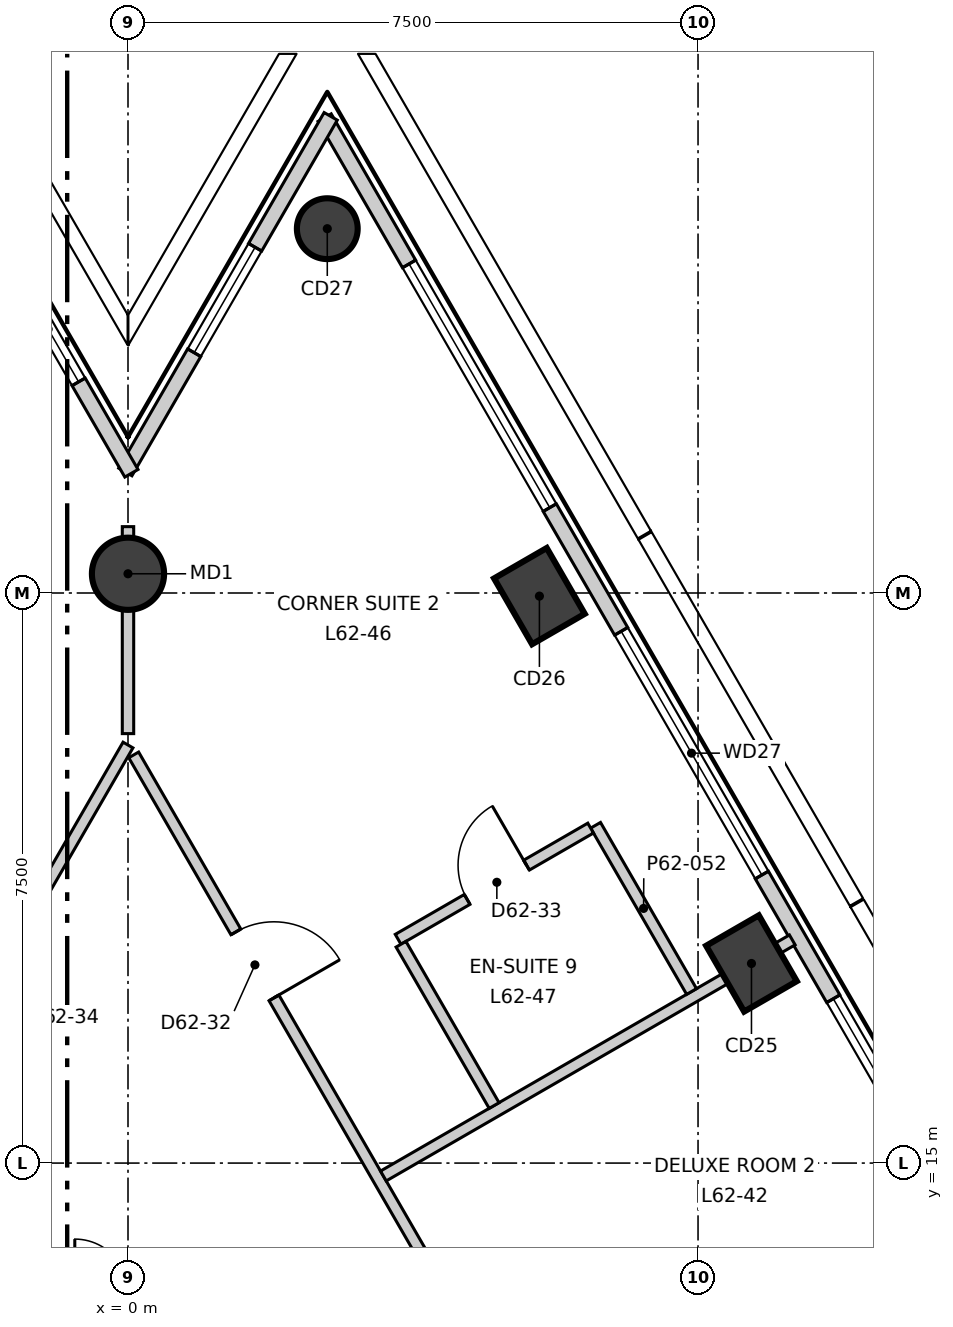
"""IFC4 building model, lengths in metres.
Left out: names, types, materials, properties, quantities, classifications, styles, units other than length and angle.
Written with IfcOpenShell. Run it as: python <this file> out.ifc"""

import sys

from ifc_helpers import new_model, si_unit, direction, frame, frame_2d, origin, origin_2d, place, context, subcontext, project, spatial, rectangle, circle, extrude, element, fill, save


model = new_model("IFC4")
c1 = context("Model", 3, precision=1e-05, world=origin(), true_north=direction((0.0, 1.0)))
c2 = subcontext(c1, "Body", "Model", "MODEL_VIEW")
j1 = project(units=[si_unit("LENGTHUNIT", "METRE"), si_unit("PLANEANGLEUNIT", "RADIAN")], contexts=[c1])
p1 = place(None, origin())
s1 = spatial("IfcSite", under=j1, at=p1, CompositionType="ELEMENT")
p2 = place(p1, origin())
s2 = spatial("IfcBuilding", under=s1, at=p2, CompositionType="ELEMENT")
p3 = place(p2, frame((0.0, 0.0, 268.3)))
s3 = spatial("IfcBuildingStorey", under=s2, at=p3, CompositionType="ELEMENT", Elevation=268.3)
for number, where, z_axis, x_axis in (
    (1, (8.203, 17.626, -0.3), (0.0, 0.0, 1.0), (-0.5, 0.866, 0.0)),
    (2, (5.413, 22.459, -0.3), (0.0, 0.0, 1.0), (-0.5, 0.866, 0.0)),
):
    element("IfcColumn", number, at=place(p3, frame(where, z_axis=z_axis, x_axis=x_axis)), inside=s3, PredefinedType="COLUMN", context=c2, shape_type="SweptSolid", body=[
        extrude(rectangle(XDim=1.0, YDim=0.8, at=origin_2d()), origin(), (0.0, 0.0, 1.0), 3.6),
    ])
p4 = place(p3, frame((2.622, 27.293, -0.3), z_axis=(0.0, 0.0, 1.0), x_axis=(-0.5, 0.866025403784, 0.0)))
e3 = element("IfcColumn", 3, at=p4, inside=s3, PredefinedType="COLUMN", context=c2, shape_type="SweptSolid", body=[
    extrude(circle(Radius=0.4, at=origin_2d()), origin(), (0.0, 0.0, 1.0), 3.6),
])
p5 = place(p3, frame((0.0, 22.753, -0.3), z_axis=(0.0, 0.0, 1.0), x_axis=(1.0, 0.0, 0.0)))
e4 = element("IfcColumn", 4, at=p5, inside=s3, PredefinedType="COLUMN", context=c2, shape_type="SweptSolid", body=[
    extrude(circle(Radius=0.475, at=origin_2d()), origin(), (0.0, 0.0, 1.0), 3.6),
])
p6 = place(p3, frame((26.205, -12.154, 0.0), z_axis=(0.0, 0.0, 1.0), x_axis=(-0.49999909388, 0.866025926932, 0.0)))
e5 = element("IfcWall", 5, at=p6, inside=s3, PredefinedType="ELEMENTEDWALL", context=c2, shape_type="SweptSolid", body=[
    extrude(rectangle(XDim=47.236, YDim=0.2, at=frame_2d((23.618, 0.0))), origin(), (0.0, 0.0, 1.0), 3.3),
])
p7 = place(p6, frame((2.243, 0.0, 0.9)))
e6 = element("IfcOpeningElement", 6, at=p7, cuts=e5, PredefinedType="OPENING", context=c2, shape_type="SweptSolid", body=[
    extrude(rectangle(XDim=3.7, YDim=2.2, at=frame_2d((1.85, 1.1))), frame((0.0, 0.11, 0.0), z_axis=(0.0, -1.0, 0.0), x_axis=(1.0, 0.0, 0.0)), (0.0, 0.0, 1.0), 0.22),
])
p8 = place(p6, frame((7.825, 0.0, 0.9)))
e7 = element("IfcOpeningElement", 7, at=p8, cuts=e5, PredefinedType="OPENING", context=c2, shape_type="SweptSolid", body=[
    extrude(rectangle(XDim=3.7, YDim=2.2, at=frame_2d((1.85, 1.1))), frame((0.0, 0.11, 0.0), z_axis=(0.0, -1.0, 0.0), x_axis=(1.0, 0.0, 0.0)), (0.0, 0.0, 1.0), 0.22),
])
p9 = place(p6, frame((13.406, 0.0, 0.9)))
e8 = element("IfcOpeningElement", 8, at=p9, cuts=e5, PredefinedType="OPENING", context=c2, shape_type="SweptSolid", body=[
    extrude(rectangle(XDim=3.7, YDim=2.2, at=frame_2d((1.85, 1.1))), frame((0.0, 0.11, 0.0), z_axis=(0.0, -1.0, 0.0), x_axis=(1.0, 0.0, 0.0)), (0.0, 0.0, 1.0), 0.22),
])
p10 = place(p6, frame((18.987, 0.0, 0.9)))
e9 = element("IfcOpeningElement", 9, at=p10, cuts=e5, PredefinedType="OPENING", context=c2, shape_type="SweptSolid", body=[
    extrude(rectangle(XDim=3.7, YDim=2.2, at=frame_2d((1.85, 1.1))), frame((0.0, 0.11, 0.0), z_axis=(0.0, -1.0, 0.0), x_axis=(1.0, 0.0, 0.0)), (0.0, 0.0, 1.0), 0.22),
])
p11 = place(p6, frame((24.569, 0.0, 0.9)))
e10 = element("IfcOpeningElement", 10, at=p11, cuts=e5, PredefinedType="OPENING", context=c2, shape_type="SweptSolid", body=[
    extrude(rectangle(XDim=3.7, YDim=2.2, at=frame_2d((1.85, 1.1))), frame((0.0, 0.11, 0.0), z_axis=(0.0, -1.0, 0.0), x_axis=(1.0, 0.0, 0.0)), (0.0, 0.0, 1.0), 0.22),
])
p12 = place(p6, frame((30.15, 0.0, 0.9)))
e11 = element("IfcOpeningElement", 11, at=p12, cuts=e5, PredefinedType="OPENING", context=c2, shape_type="SweptSolid", body=[
    extrude(rectangle(XDim=3.7, YDim=2.2, at=frame_2d((1.85, 1.1))), frame((0.0, 0.11, 0.0), z_axis=(0.0, -1.0, 0.0), x_axis=(1.0, 0.0, 0.0)), (0.0, 0.0, 1.0), 0.22),
])
p13 = place(p6, frame((35.732, 0.0, 0.9)))
e12 = element("IfcOpeningElement", 12, at=p13, cuts=e5, PredefinedType="OPENING", context=c2, shape_type="SweptSolid", body=[
    extrude(rectangle(XDim=3.7, YDim=2.2, at=frame_2d((1.85, 1.1))), frame((0.0, 0.11, 0.0), z_axis=(0.0, -1.0, 0.0), x_axis=(1.0, 0.0, 0.0)), (0.0, 0.0, 1.0), 0.22),
])
p14 = place(p6, frame((41.313, 0.0, 0.9)))
e13 = element("IfcOpeningElement", 13, at=p14, cuts=e5, PredefinedType="OPENING", context=c2, shape_type="SweptSolid", body=[
    extrude(rectangle(XDim=3.7, YDim=2.2, at=frame_2d((1.85, 1.1))), frame((0.0, 0.11, 0.0), z_axis=(0.0, -1.0, 0.0), x_axis=(1.0, 0.0, 0.0)), (0.0, 0.0, 1.0), 0.22),
])
p15 = place(p3, frame((2.667, 28.771, 0.0), z_axis=(0.0, 0.0, 1.0), x_axis=(-0.500070558953, -0.865984662721, 0.0)))
e14 = element("IfcWall", 14, at=p15, inside=s3, PredefinedType="ELEMENTEDWALL", context=c2, shape_type="SweptSolid", body=[
    extrude(rectangle(XDim=5.403, YDim=0.2, at=frame_2d((2.702, 0.0))), origin(), (0.0, 0.0, 1.0), 3.3),
])
p16 = place(p15, frame((1.99, 0.0, 0.9)))
e15 = element("IfcOpeningElement", 15, at=p16, cuts=e14, PredefinedType="OPENING", context=c2, shape_type="SweptSolid", body=[
    extrude(rectangle(XDim=1.6, YDim=2.2, at=frame_2d((0.8, 1.1))), frame((0.0, 0.11, 0.0), z_axis=(0.0, -1.0, 0.0), x_axis=(1.0, 0.0, 0.0)), (0.0, 0.0, 1.0), 0.22),
])
p17 = place(p3, frame((0.045, 24.075, 0.0), z_axis=(0.0, 0.0, 1.0), x_axis=(-0.500070558953, 0.865984662721, 0.0)))
e16 = element("IfcWall", 16, at=p17, inside=s3, PredefinedType="ELEMENTEDWALL", context=c2, shape_type="SweptSolid", body=[
    extrude(rectangle(XDim=5.403, YDim=0.2, at=frame_2d((2.702, 0.0))), origin(), (0.0, 0.0, 1.0), 3.3),
])
p18 = place(p17, frame((1.39, 0.0, 0.9)))
e17 = element("IfcOpeningElement", 17, at=p18, cuts=e16, PredefinedType="OPENING", context=c2, shape_type="SweptSolid", body=[
    extrude(rectangle(XDim=1.6, YDim=2.2, at=frame_2d((0.8, 1.1))), frame((0.0, 0.11, 0.0), z_axis=(0.0, -1.0, 0.0), x_axis=(1.0, 0.0, 0.0)), (0.0, 0.0, 1.0), 0.22),
])
p19 = place(p3, frame((-17.678, -10.12, 0.0), z_axis=(0.0, 0.0, 1.0), x_axis=(0.49998824015, 0.86603219323, 0.0)))
e18 = element("IfcWall", 18, at=p19, inside=s3, PredefinedType="PARTITIONING", context=c2, shape_type="SweptSolid", body=[
    extrude(rectangle(XDim=35.357, YDim=0.15, at=frame_2d((17.678, 0.0))), origin(), (0.0, 0.0, 1.0), 3.3),
])
p20 = place(p19, frame((31.607, 0.0, 0.0)))
e19 = element("IfcOpeningElement", 19, at=p20, cuts=e18, PredefinedType="OPENING", context=c2, shape_type="SweptSolid", body=[
    extrude(rectangle(XDim=1.0, YDim=2.1, at=frame_2d((0.5, 1.05))), frame((0.0, 0.085, 0.0), z_axis=(0.0, -1.0, 0.0), x_axis=(1.0, 0.0, 0.0)), (0.0, 0.0, 1.0), 0.17),
])
p21 = place(p19, frame((19.416, 0.0, 0.0)))
e20 = element("IfcOpeningElement", 20, at=p21, cuts=e18, PredefinedType="OPENING", context=c2, shape_type="SweptSolid", body=[
    extrude(rectangle(XDim=1.0, YDim=2.1, at=frame_2d((0.5, 1.05))), frame((0.0, 0.085, 0.0), z_axis=(0.0, -1.0, 0.0), x_axis=(1.0, 0.0, 0.0)), (0.0, 0.0, 1.0), 0.17),
])
p22 = place(p19, frame((24.916, 0.0, 0.0)))
e21 = element("IfcOpeningElement", 21, at=p22, cuts=e18, PredefinedType="OPENING", context=c2, shape_type="SweptSolid", body=[
    extrude(rectangle(XDim=0.9, YDim=2.1, at=frame_2d((0.45, 1.05))), frame((0.0, 0.085, 0.0), z_axis=(0.0, -1.0, 0.0), x_axis=(1.0, 0.0, 0.0)), (0.0, 0.0, 1.0), 0.17),
])
p23 = place(p19, frame((22.816, 0.0, 0.0)))
e22 = element("IfcOpeningElement", 22, at=p23, cuts=e18, PredefinedType="OPENING", context=c2, shape_type="SweptSolid", body=[
    extrude(rectangle(XDim=0.9, YDim=2.1, at=frame_2d((0.45, 1.05))), frame((0.0, 0.085, 0.0), z_axis=(0.0, -1.0, 0.0), x_axis=(1.0, 0.0, 0.0)), (0.0, 0.0, 1.0), 0.17),
])
p24 = place(p19, frame((14.654, 0.0, 0.0)))
e23 = element("IfcOpeningElement", 23, at=p24, cuts=e18, PredefinedType="OPENING", context=c2, shape_type="SweptSolid", body=[
    extrude(rectangle(XDim=1.0, YDim=2.1, at=frame_2d((0.5, 1.05))), frame((0.0, 0.085, 0.0), z_axis=(0.0, -1.0, 0.0), x_axis=(1.0, 0.0, 0.0)), (0.0, 0.0, 1.0), 0.17),
])
p25 = place(p19, frame((7.672, 0.0, 0.0)))
e24 = element("IfcOpeningElement", 24, at=p25, cuts=e18, PredefinedType="OPENING", context=c2, shape_type="SweptSolid", body=[
    extrude(rectangle(XDim=1.0, YDim=2.1, at=frame_2d((0.5, 1.05))), frame((0.0, 0.085, 0.0), z_axis=(0.0, -1.0, 0.0), x_axis=(1.0, 0.0, 0.0)), (0.0, 0.0, 1.0), 0.17),
])
p26 = place(p19, frame((2.69, 0.0, 0.0)))
e25 = element("IfcOpeningElement", 25, at=p26, cuts=e18, PredefinedType="OPENING", context=c2, shape_type="SweptSolid", body=[
    extrude(rectangle(XDim=1.0, YDim=2.1, at=frame_2d((0.5, 1.05))), frame((0.0, 0.085, 0.0), z_axis=(0.0, -1.0, 0.0), x_axis=(1.0, 0.0, 0.0)), (0.0, 0.0, 1.0), 0.17),
])
p27 = place(p3, frame((0.0, 20.65, 0.0), z_axis=(0.0, 0.0, 1.0), x_axis=(0.0, 1.0, 0.0)))
e26 = element("IfcWall", 26, at=p27, inside=s3, PredefinedType="PARTITIONING", context=c2, shape_type="SweptSolid", body=[
    extrude(rectangle(XDim=2.723, YDim=0.15, at=frame_2d((1.362, 0.0))), origin(), (0.0, 0.0, 1.0), 2.8),
])
p28 = place(p3, frame((0.075, 20.37, 0.0), z_axis=(0.0, 0.0, 1.0), x_axis=(0.499988971979, -0.866031770721, 0.0)))
e27 = element("IfcWall", 27, at=p28, inside=s3, PredefinedType="PARTITIONING", context=c2, shape_type="SweptSolid", body=[
    extrude(rectangle(XDim=35.207, YDim=0.15, at=frame_2d((17.604, 0.0))), origin(), (0.0, 0.0, 1.0), 3.3),
])
p29 = place(p28, frame((31.606, 0.0, 0.0)))
e28 = element("IfcOpeningElement", 28, at=p29, cuts=e27, PredefinedType="OPENING", context=c2, shape_type="SweptSolid", body=[
    extrude(rectangle(XDim=1.0, YDim=2.1, at=frame_2d((0.5, 1.05))), frame((0.0, 0.085, 0.0), z_axis=(0.0, -1.0, 0.0), x_axis=(1.0, 0.0, 0.0)), (0.0, 0.0, 1.0), 0.17),
])
p30 = place(p28, frame((24.316, 0.0, 0.0)))
e29 = element("IfcOpeningElement", 29, at=p30, cuts=e27, PredefinedType="OPENING", context=c2, shape_type="SweptSolid", body=[
    extrude(rectangle(XDim=1.0, YDim=2.1, at=frame_2d((0.5, 1.05))), frame((0.0, 0.085, 0.0), z_axis=(0.0, -1.0, 0.0), x_axis=(1.0, 0.0, 0.0)), (0.0, 0.0, 1.0), 0.17),
])
p31 = place(p28, frame((18.735, 0.0, 0.0)))
e30 = element("IfcOpeningElement", 30, at=p31, cuts=e27, PredefinedType="OPENING", context=c2, shape_type="SweptSolid", body=[
    extrude(rectangle(XDim=1.0, YDim=2.1, at=frame_2d((0.5, 1.05))), frame((0.0, 0.085, 0.0), z_axis=(0.0, -1.0, 0.0), x_axis=(1.0, 0.0, 0.0)), (0.0, 0.0, 1.0), 0.17),
])
p32 = place(p28, frame((8.154, 0.0, 0.0)))
e31 = element("IfcOpeningElement", 31, at=p32, cuts=e27, PredefinedType="OPENING", context=c2, shape_type="SweptSolid", body=[
    extrude(rectangle(XDim=1.0, YDim=2.1, at=frame_2d((0.5, 1.05))), frame((0.0, 0.085, 0.0), z_axis=(0.0, -1.0, 0.0), x_axis=(1.0, 0.0, 0.0)), (0.0, 0.0, 1.0), 0.17),
])
p33 = place(p28, frame((13.754, 0.0, 0.0)))
e32 = element("IfcOpeningElement", 32, at=p33, cuts=e27, PredefinedType="OPENING", context=c2, shape_type="SweptSolid", body=[
    extrude(rectangle(XDim=0.9, YDim=2.1, at=frame_2d((0.45, 1.05))), frame((0.0, 0.085, 0.0), z_axis=(0.0, -1.0, 0.0), x_axis=(1.0, 0.0, 0.0)), (0.0, 0.0, 1.0), 0.17),
])
p34 = place(p28, frame((11.554, 0.0, 0.0)))
e33 = element("IfcOpeningElement", 33, at=p34, cuts=e27, PredefinedType="OPENING", context=c2, shape_type="SweptSolid", body=[
    extrude(rectangle(XDim=0.9, YDim=2.1, at=frame_2d((0.45, 1.05))), frame((0.0, 0.085, 0.0), z_axis=(0.0, -1.0, 0.0), x_axis=(1.0, 0.0, 0.0)), (0.0, 0.0, 1.0), 0.17),
])
p35 = place(p28, frame((2.69, 0.0, 0.0)))
e34 = element("IfcOpeningElement", 34, at=p35, cuts=e27, PredefinedType="OPENING", context=c2, shape_type="SweptSolid", body=[
    extrude(rectangle(XDim=1.0, YDim=2.1, at=frame_2d((0.5, 1.05))), frame((0.0, 0.085, 0.0), z_axis=(0.0, -1.0, 0.0), x_axis=(1.0, 0.0, 0.0)), (0.0, 0.0, 1.0), 0.17),
])
p36 = place(p3, frame((3.36, 14.83, 0.0), z_axis=(0.0, 0.0, 1.0), x_axis=(0.866033751423, 0.499985541187, 0.0)))
e35 = element("IfcWall", 35, at=p36, inside=s3, PredefinedType="PARTITIONING", context=c2, shape_type="SweptSolid", body=[
    extrude(rectangle(XDim=6.212, YDim=0.15, at=frame_2d((3.106, 0.0))), origin(), (0.0, 0.0, 1.0), 3.3),
])
p37 = place(p3, frame((6.152, 19.444, 0.0), z_axis=(0.0, 0.0, 1.0), x_axis=(0.500079482444, -0.865979509711, 0.0)))
e36 = element("IfcWall", 36, at=p37, inside=s3, PredefinedType="PARTITIONING", context=c2, shape_type="SweptSolid", body=[
    extrude(rectangle(XDim=2.525, YDim=0.15, at=frame_2d((1.263, 0.0))), origin(), (0.0, 0.0, 1.0), 3.3),
])
p38 = place(p3, frame((3.554, 17.944, 0.0), z_axis=(0.0, 0.0, 1.0), x_axis=(0.865953438489, 0.500124626836, 0.0)))
e37 = element("IfcWall", 37, at=p38, inside=s3, PredefinedType="PARTITIONING", context=c2, shape_type="SweptSolid", body=[
    extrude(rectangle(XDim=2.925, YDim=0.15, at=frame_2d((1.462, 0.0))), origin(), (0.0, 0.0, 1.0), 3.3),
])
p39 = place(p38, frame((1.05, 0.0, 0.0)))
e38 = element("IfcOpeningElement", 38, at=p39, cuts=e37, PredefinedType="OPENING", context=c2, shape_type="SweptSolid", body=[
    extrude(rectangle(XDim=0.9, YDim=2.1, at=frame_2d((0.45, 1.05))), frame((0.0, 0.085, 0.0), z_axis=(0.0, -1.0, 0.0), x_axis=(1.0, 0.0, 0.0)), (0.0, 0.0, 1.0), 0.17),
])
p40 = place(p3, frame((3.592, 17.879, 0.0), z_axis=(0.0, 0.0, 1.0), x_axis=(0.499943856944, -0.866057815567, 0.0)))
e39 = element("IfcWall", 39, at=p40, inside=s3, PredefinedType="PARTITIONING", context=c2, shape_type="SweptSolid", body=[
    extrude(rectangle(XDim=2.45, YDim=0.15, at=frame_2d((1.225, 0.0))), origin(), (0.0, 0.0, 1.0), 3.3),
])
p41 = place(p12, origin())
e40 = element("IfcWindow", 40, at=p41, inside=s3, PartitioningType="SINGLE_PANEL", PredefinedType="WINDOW", context=c2, shape_type="SweptSolid", body=[
    extrude(rectangle(XDim=3.7, YDim=2.2, at=frame_2d((1.85, 1.1))), frame((0.0, 0.03, 0.0), z_axis=(0.0, -1.0, 0.0), x_axis=(1.0, 0.0, 0.0)), (0.0, 0.0, 1.0), 0.06),
])
fill(e11, e40)
p42 = place(p13, origin())
e41 = element("IfcWindow", 41, at=p42, inside=s3, PartitioningType="SINGLE_PANEL", PredefinedType="WINDOW", context=c2, shape_type="SweptSolid", body=[
    extrude(rectangle(XDim=3.7, YDim=2.2, at=frame_2d((1.85, 1.1))), frame((0.0, 0.03, 0.0), z_axis=(0.0, -1.0, 0.0), x_axis=(1.0, 0.0, 0.0)), (0.0, 0.0, 1.0), 0.06),
])
fill(e12, e41)
p43 = place(p14, origin())
e42 = element("IfcWindow", 42, at=p43, inside=s3, PartitioningType="SINGLE_PANEL", PredefinedType="WINDOW", context=c2, shape_type="SweptSolid", body=[
    extrude(rectangle(XDim=3.7, YDim=2.2, at=frame_2d((1.85, 1.1))), frame((0.0, 0.03, 0.0), z_axis=(0.0, -1.0, 0.0), x_axis=(1.0, 0.0, 0.0)), (0.0, 0.0, 1.0), 0.06),
])
fill(e13, e42)
p44 = place(p16, origin())
e43 = element("IfcWindow", 43, at=p44, inside=s3, PartitioningType="SINGLE_PANEL", PredefinedType="WINDOW", context=c2, shape_type="SweptSolid", body=[
    extrude(rectangle(XDim=1.6, YDim=2.2, at=frame_2d((0.8, 1.1))), frame((0.0, 0.03, 0.0), z_axis=(0.0, -1.0, 0.0), x_axis=(1.0, 0.0, 0.0)), (0.0, 0.0, 1.0), 0.06),
])
fill(e15, e43)
p45 = place(p18, origin())
e44 = element("IfcWindow", 44, at=p45, inside=s3, PartitioningType="SINGLE_PANEL", PredefinedType="WINDOW", context=c2, shape_type="SweptSolid", body=[
    extrude(rectangle(XDim=1.6, YDim=2.2, at=frame_2d((0.8, 1.1))), frame((0.0, 0.03, 0.0), z_axis=(0.0, -1.0, 0.0), x_axis=(1.0, 0.0, 0.0)), (0.0, 0.0, 1.0), 0.06),
])
fill(e17, e44)
p46 = place(p35, origin())
e45 = element("IfcDoor", 45, at=p46, inside=s3, OperationType="SINGLE_SWING_LEFT", PredefinedType="DOOR", context=c2, shape_type="SweptSolid", body=[
    extrude(rectangle(XDim=1.0, YDim=2.1, at=frame_2d((0.5, 1.05))), frame((0.0, 0.025, 0.0), z_axis=(0.0, -1.0, 0.0), x_axis=(1.0, 0.0, 0.0)), (0.0, 0.0, 1.0), 0.05),
])
fill(e34, e45)
p47 = place(p39, origin())
e46 = element("IfcDoor", 46, at=p47, inside=s3, OperationType="SINGLE_SWING_LEFT", PredefinedType="DOOR", context=c2, shape_type="SweptSolid", body=[
    extrude(rectangle(XDim=0.9, YDim=2.1, at=frame_2d((0.45, 1.05))), frame((0.0, 0.025, 0.0), z_axis=(0.0, -1.0, 0.0), x_axis=(1.0, 0.0, 0.0)), (0.0, 0.0, 1.0), 0.05),
])
fill(e38, e46)
save(model, sys.argv[1])
